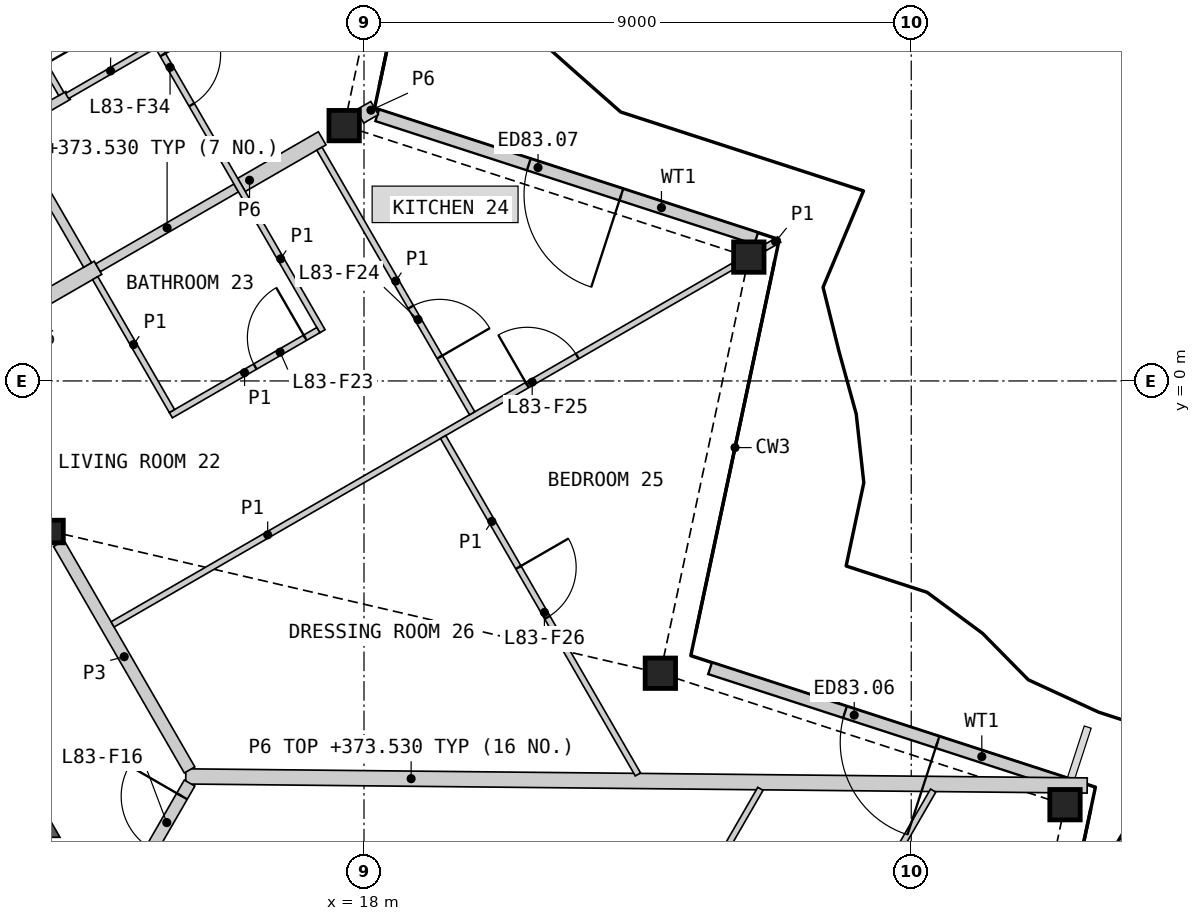
"""IFC4 building model, lengths in metres.
Left out: names, types, materials, properties, quantities, classifications, styles, units other than length and angle.
Written with IfcOpenShell. Run it as: python <this file> out.ifc"""

import sys

from ifc_helpers import new_model, si_unit, direction, frame, frame_2d, origin, origin_2d, place, context, subcontext, project, spatial, polyline, rectangle, hollow_rectangle, i_section, outline, extrude, element, fill, save


model = new_model("IFC4")
c1 = context("Model", 3, precision=1e-05, world=origin(), true_north=direction((0.0, 1.0)))
c2 = subcontext(c1, "Body", "Model", "MODEL_VIEW")
j1 = project(units=[si_unit("LENGTHUNIT", "METRE"), si_unit("PLANEANGLEUNIT", "RADIAN")], contexts=[c1])
p1 = place(None, origin())
s1 = spatial("IfcSite", under=j1, at=p1, CompositionType="ELEMENT")
p2 = place(p1, origin())
s2 = spatial("IfcBuilding", under=s1, at=p2, CompositionType="ELEMENT")
p3 = place(p2, frame((0.0, 0.0, 371.2)))
s3 = spatial("IfcBuildingStorey", under=s2, at=p3, CompositionType="ELEMENT", Elevation=371.2)
for number, where, z_axis, x_axis in (
    (1, (29.529, -6.969, 0.0), (0.0, 0.0, 1.0), (1.0, 0.0, 0.0)),
    (2, (22.874, -4.807, 0.0), (0.0, 0.0, 1.0), (1.0, 0.0, 0.0)),
    (3, (24.329, 2.037, 0.0), (0.0, 0.0, 1.0), (1.0, 0.0, 0.0)),
    (4, (17.674, 4.199, 0.0), (0.0, 0.0, 1.0), (1.0, 0.0, 0.0)),
):
    element("IfcColumn", number, at=place(p3, frame(where, z_axis=z_axis, x_axis=x_axis)), inside=s3, PredefinedType="COLUMN", context=c2, shape_type="SweptSolid", body=[
        extrude(hollow_rectangle(XDim=0.5, YDim=0.5, WallThickness=0.03, at=origin_2d()), origin(), (0.0, 0.0, 1.0), 3.4),
    ])
p4 = place(p3, frame((12.868, -2.476, 0.0), z_axis=(0.0, 0.0, 1.0), x_axis=(1.0, 0.0, 0.0)))
e5 = element("IfcColumn", 5, at=p4, inside=s3, PredefinedType="COLUMN", context=c2, shape_type="SweptSolid", body=[
    extrude(i_section(OverallWidth=0.374, OverallDepth=0.372, WebThickness=0.016, FlangeThickness=0.026, at=origin_2d()), origin(), (0.0, 0.0, 1.0), 3.4),
])
p5 = place(p3, frame((29.65, -6.663, 0.0), z_axis=(0.0, 0.0, 1.0), x_axis=(-0.951056402988, 0.3090173431, 0.0)))
e6 = element("IfcWall", 6, at=p5, inside=s3, PredefinedType="SOLIDWALL", context=c2, shape_type="SweptSolid", body=[
    extrude(rectangle(XDim=6.265, YDim=0.2, at=frame_2d((3.133, 0.0))), origin(), (0.0, 0.0, 1.0), 2.634),
])
p6 = place(p5, frame((2.333, 0.0, 0.0)))
e7 = element("IfcOpeningElement", 7, at=p6, cuts=e6, PredefinedType="OPENING", context=c2, shape_type="SweptSolid", body=[
    extrude(rectangle(XDim=1.6, YDim=2.25, at=frame_2d((0.8, 1.125))), frame((0.0, 0.11, 0.0), z_axis=(0.0, -1.0, 0.0), x_axis=(1.0, 0.0, 0.0)), (0.0, 0.0, 1.0), 0.22),
])
p7 = place(p3, frame((24.45, 2.344, 0.0), z_axis=(0.0, 0.0, 1.0), x_axis=(-0.951062538214, 0.308998460199, 0.0)))
e8 = element("IfcWall", 8, at=p7, inside=s3, PredefinedType="SOLIDWALL", context=c2, shape_type="SweptSolid", body=[
    extrude(rectangle(XDim=6.553, YDim=0.2, at=frame_2d((3.277, 0.0))), origin(), (0.0, 0.0, 1.0), 2.634),
])
p8 = place(p7, frame((2.333, 0.0, 0.0)))
e9 = element("IfcOpeningElement", 9, at=p8, cuts=e8, PredefinedType="OPENING", context=c2, shape_type="SweptSolid", body=[
    extrude(rectangle(XDim=1.6, YDim=2.25, at=frame_2d((0.8, 1.125))), frame((0.0, 0.11, 0.0), z_axis=(0.0, -1.0, 0.0), x_axis=(1.0, 0.0, 0.0)), (0.0, 0.0, 1.0), 0.22),
])
p9 = place(p3, origin())
e10 = element("IfcWall", 10, at=p9, inside=s3, PredefinedType="SHEAR", context=c2, shape_type="SweptSolid", body=[
    extrude(outline(polyline([(11.961, -7.506), (11.961, -6.906), (12.48, -6.606), (13.0, -7.506), (11.961, -7.506)])), origin(), (0.0, 0.0, 1.0), 3.1),
])
p10 = place(p3, frame((15.069, -6.504, 0.0), z_axis=(0.0, 0.0, 1.0), x_axis=(0.999949045807, -0.01009483976, 0.0)))
e11 = element("IfcWall", 11, at=p10, inside=s3, PredefinedType="PARTITIONING", context=c2, shape_type="SweptSolid", body=[
    extrude(rectangle(XDim=14.825, YDim=0.25, at=frame_2d((7.413, 0.0))), origin(), (0.0, 0.0, 1.0), 2.33),
])
p11 = place(p3, frame((12.981, -2.673, 0.0), z_axis=(0.0, 0.0, 1.0), x_axis=(0.499986217557, -0.866033360935, 0.0)))
e12 = element("IfcWall", 12, at=p11, inside=s3, PredefinedType="PARTITIONING", context=c2, shape_type="SweptSolid", body=[
    extrude(rectangle(XDim=4.3, YDim=0.2, at=frame_2d((2.15, 0.0))), origin(), (0.0, 0.0, 1.0), 3.1),
])
p12 = place(p3, frame((13.293, -9.797, 0.0), z_axis=(0.0, 0.0, 1.0), x_axis=(0.499967746641, 0.866044024469, 0.0)))
e13 = element("IfcWall", 13, at=p12, inside=s3, PredefinedType="PARTITIONING", context=c2, shape_type="SweptSolid", body=[
    extrude(rectangle(XDim=3.676, YDim=0.2, at=frame_2d((1.838, 0.0))), origin(), (0.0, 0.0, 1.0), 3.1),
])
p13 = place(p12, frame((2.426, 0.0, 0.0)))
e14 = element("IfcOpeningElement", 14, at=p13, cuts=e13, PredefinedType="OPENING", context=c2, shape_type="SweptSolid", body=[
    extrude(rectangle(XDim=1.0, YDim=2.1, at=frame_2d((0.5, 1.05))), frame((0.0, 0.11, 0.0), z_axis=(0.0, -1.0, 0.0), x_axis=(1.0, 0.0, 0.0)), (0.0, 0.0, 1.0), 0.22),
])
p14 = place(p3, frame((11.265, 0.5, 0.0), z_axis=(0.0, 0.0, 1.0), x_axis=(0.866051307416, 0.49995513091, 0.0)))
e15 = element("IfcWall", 15, at=p14, inside=s3, PredefinedType="PARTITIONING", context=c2, shape_type="SweptSolid", body=[
    extrude(rectangle(XDim=2.725, YDim=0.25, at=frame_2d((1.362, 0.0))), origin(), (0.0, 0.0, 1.0), 2.33),
])
p15 = place(p3, frame((15.985, 3.224, 0.0), z_axis=(0.0, 0.0, 1.0), x_axis=(0.865989259495, 0.50006259852, 0.0)))
e16 = element("IfcWall", 16, at=p15, inside=s3, PredefinedType="PARTITIONING", context=c2, shape_type="SweptSolid", body=[
    extrude(rectangle(XDim=1.532, YDim=0.25, at=frame_2d((0.766, 0.0))), origin(), (0.0, 0.0, 1.0), 2.33),
])
p16 = place(p3, frame((17.934, 4.35, 0.0), z_axis=(0.0, 0.0, 1.0), x_axis=(0.866288059981, 0.499544789918, 0.0)))
e17 = element("IfcWall", 17, at=p16, inside=s3, PredefinedType="PARTITIONING", context=c2, shape_type="SweptSolid", body=[
    extrude(rectangle(XDim=0.278, YDim=0.25, at=frame_2d((0.139, 0.0))), origin(), (0.0, 0.0, 1.0), 2.33),
])
p17 = place(p3, frame((13.625, 1.862, 0.0), z_axis=(0.0, 0.0, 1.0), x_axis=(0.866013657776, 0.500020344131, 0.0)))
e18 = element("IfcWall", 18, at=p17, inside=s3, PredefinedType="PLUMBINGWALL", context=c2, shape_type="SweptSolid", body=[
    extrude(rectangle(XDim=2.625, YDim=0.15, at=frame_2d((1.312, 0.0))), origin(), (0.0, 0.0, 1.0), 2.33),
])
p18 = place(p3, frame((12.129, 4.203, 0.0), z_axis=(0.0, 0.0, 1.0), x_axis=(0.499993606316, -0.866029095148, 0.0)))
e19 = element("IfcWall", 19, at=p18, inside=s3, PredefinedType="PLUMBINGWALL", context=c2, shape_type="SweptSolid", body=[
    extrude(rectangle(XDim=2.65, YDim=0.15, at=frame_2d((1.325, 0.0))), origin(), (0.0, 0.0, 1.0), 2.33),
])
p19 = place(p3, frame((12.232, 4.175, 0.0), z_axis=(0.0, 0.0, 1.0), x_axis=(0.866056787991, 0.499945637019, 0.0)))
e20 = element("IfcWall", 20, at=p19, inside=s3, PredefinedType="PLUMBINGWALL", context=c2, shape_type="SweptSolid", body=[
    extrude(rectangle(XDim=1.042, YDim=0.15, at=frame_2d((0.521, 0.0))), origin(), (0.0, 0.0, 1.0), 2.33),
])
p20 = place(p3, frame((13.865, -4.004, 0.0), z_axis=(0.0, 0.0, 1.0), x_axis=(0.866023404247, 0.500003463284, 0.0)))
e21 = element("IfcWall", 21, at=p20, inside=s3, PredefinedType="PARTITIONING", context=c2, shape_type="SweptSolid", body=[
    extrude(rectangle(XDim=11.782, YDim=0.1, at=frame_2d((5.891, 0.0))), origin(), (0.0, 0.0, 1.0), 2.33),
])
p21 = place(p20, frame((7.874, 0.0, 0.0)))
e22 = element("IfcOpeningElement", 22, at=p21, cuts=e21, PredefinedType="OPENING", context=c2, shape_type="SweptSolid", body=[
    extrude(rectangle(XDim=0.95, YDim=2.1, at=frame_2d((0.475, 1.05))), frame((0.0, 0.06, 0.0), z_axis=(0.0, -1.0, 0.0), x_axis=(1.0, 0.0, 0.0)), (0.0, 0.0, 1.0), 0.12),
])
p22 = place(p3, frame((8.775, 5.066, 0.0), z_axis=(0.0, 0.0, 1.0), x_axis=(0.866023724155, 0.500002909193, 0.0)))
e23 = element("IfcWall", 23, at=p22, inside=s3, PredefinedType="PARTITIONING", context=c2, shape_type="SweptSolid", body=[
    extrude(rectangle(XDim=11.655, YDim=0.1, at=frame_2d((5.827, 0.0))), origin(), (0.0, 0.0, 1.0), 2.33),
])
p23 = place(p22, frame((3.751, 0.0, 0.0)))
e24 = element("IfcOpeningElement", 24, at=p23, cuts=e23, PredefinedType="OPENING", context=c2, shape_type="SweptSolid", body=[
    extrude(rectangle(XDim=0.95, YDim=2.1, at=frame_2d((0.475, 1.05))), frame((0.0, 0.06, 0.0), z_axis=(0.0, -1.0, 0.0), x_axis=(1.0, 0.0, 0.0)), (0.0, 0.0, 1.0), 0.12),
])
p24 = place(p3, frame((23.463, -13.488, 0.0), z_axis=(0.0, 0.0, 1.0), x_axis=(0.500012519194, 0.866018175704, 0.0)))
e25 = element("IfcWall", 25, at=p24, inside=s3, PredefinedType="PARTITIONING", context=c2, shape_type="SweptSolid", body=[
    extrude(rectangle(XDim=7.796, YDim=0.1, at=frame_2d((3.898, 0.0))), origin(), (0.0, 0.0, 1.0), 2.33),
])
p25 = place(p24, frame((3.473, 0.0, 0.0)))
e26 = element("IfcOpeningElement", 26, at=p25, cuts=e25, PredefinedType="OPENING", context=c2, shape_type="SweptSolid", body=[
    extrude(rectangle(XDim=0.95, YDim=2.1, at=frame_2d((0.475, 1.05))), frame((0.0, 0.06, 0.0), z_axis=(0.0, -1.0, 0.0), x_axis=(1.0, 0.0, 0.0)), (0.0, 0.0, 1.0), 0.12),
])
p26 = place(p3, frame((19.302, -0.923, 0.0), z_axis=(0.0, 0.0, 1.0), x_axis=(0.499999516514, -0.866025682925, 0.0)))
e27 = element("IfcWall", 27, at=p26, inside=s3, PredefinedType="PARTITIONING", context=c2, shape_type="SweptSolid", body=[
    extrude(rectangle(XDim=6.407, YDim=0.1, at=frame_2d((3.204, 0.0))), origin(), (0.0, 0.0, 1.0), 2.33),
])
p27 = place(p26, frame((2.476, 0.0, 0.0)))
e28 = element("IfcOpeningElement", 28, at=p27, cuts=e27, PredefinedType="OPENING", context=c2, shape_type="SweptSolid", body=[
    extrude(rectangle(XDim=0.95, YDim=2.1, at=frame_2d((0.475, 1.05))), frame((0.0, 0.06, 0.0), z_axis=(0.0, -1.0, 0.0), x_axis=(1.0, 0.0, 0.0)), (0.0, 0.0, 1.0), 0.12),
])
p28 = place(p3, frame((21.319, -12.251, 0.0), z_axis=(0.0, 0.0, 1.0), x_axis=(0.499999833739, 0.866025499775, 0.0)))
e29 = element("IfcWall", 29, at=p28, inside=s3, PredefinedType="PARTITIONING", context=c2, shape_type="SweptSolid", body=[
    extrude(rectangle(XDim=6.4, YDim=0.1, at=frame_2d((3.2, 0.0))), origin(), (0.0, 0.0, 1.0), 2.33),
])
p29 = place(p28, frame((1.26, 0.0, 0.0)))
e30 = element("IfcOpeningElement", 30, at=p29, cuts=e29, PredefinedType="OPENING", context=c2, shape_type="SweptSolid", body=[
    extrude(rectangle(XDim=0.95, YDim=2.1, at=frame_2d((0.475, 1.05))), frame((0.0, 0.06, 0.0), z_axis=(0.0, -1.0, 0.0), x_axis=(1.0, 0.0, 0.0)), (0.0, 0.0, 1.0), 0.12),
])
p30 = place(p3, frame((14.567, 5.581, 0.0), z_axis=(0.0, 0.0, 1.0), x_axis=(0.499996545922, -0.866027397988, 0.0)))
e31 = element("IfcWall", 31, at=p30, inside=s3, PredefinedType="PARTITIONING", context=c2, shape_type="SweptSolid", body=[
    extrude(rectangle(XDim=5.5, YDim=0.1, at=frame_2d((2.75, 0.0))), origin(), (0.0, 0.0, 1.0), 2.33),
])
p31 = place(p30, frame((0.25, 0.0, 0.0)))
e32 = element("IfcOpeningElement", 32, at=p31, cuts=e31, PredefinedType="OPENING", context=c2, shape_type="SweptSolid", body=[
    extrude(rectangle(XDim=0.95, YDim=2.1, at=frame_2d((0.475, 1.05))), frame((0.0, 0.06, 0.0), z_axis=(0.0, -1.0, 0.0), x_axis=(1.0, 0.0, 0.0)), (0.0, 0.0, 1.0), 0.12),
])
p32 = place(p3, frame((17.266, 3.82, 0.0), z_axis=(0.0, 0.0, 1.0), x_axis=(0.499990214365, -0.86603105345, 0.0)))
e33 = element("IfcWall", 33, at=p32, inside=s3, PredefinedType="PARTITIONING", context=c2, shape_type="SweptSolid", body=[
    extrude(rectangle(XDim=5.025, YDim=0.1, at=frame_2d((2.512, 0.0))), origin(), (0.0, 0.0, 1.0), 2.33),
])
p33 = place(p32, frame((3.008, 0.0, 0.0)))
e34 = element("IfcOpeningElement", 34, at=p33, cuts=e33, PredefinedType="OPENING", context=c2, shape_type="SweptSolid", body=[
    extrude(rectangle(XDim=0.95, YDim=2.1, at=frame_2d((0.475, 1.05))), frame((0.0, 0.06, 0.0), z_axis=(0.0, -1.0, 0.0), x_axis=(1.0, 0.0, 0.0)), (0.0, 0.0, 1.0), 0.12),
])
p34 = place(p3, frame((14.823, -0.564, 0.0), z_axis=(0.0, 0.0, 1.0), x_axis=(0.866034573852, 0.49998411664, 0.0)))
e35 = element("IfcWall", 35, at=p34, inside=s3, PredefinedType="PARTITIONING", context=c2, shape_type="SweptSolid", body=[
    extrude(rectangle(XDim=2.8, YDim=0.1, at=frame_2d((1.4, 0.0))), origin(), (0.0, 0.0, 1.0), 2.33),
])
p35 = place(p34, frame((1.6, 0.0, 0.0)))
e36 = element("IfcOpeningElement", 36, at=p35, cuts=e35, PredefinedType="OPENING", context=c2, shape_type="SweptSolid", body=[
    extrude(rectangle(XDim=0.95, YDim=2.1, at=frame_2d((0.475, 1.05))), frame((0.0, 0.06, 0.0), z_axis=(0.0, -1.0, 0.0), x_axis=(1.0, 0.0, 0.0)), (0.0, 0.0, 1.0), 0.12),
])
p36 = place(p3, frame((13.579, 1.691, 0.0), z_axis=(0.0, 0.0, 1.0), x_axis=(0.500048846702, -0.865997200291, 0.0)))
e37 = element("IfcWall", 37, at=p36, inside=s3, PredefinedType="PARTITIONING", context=c2, shape_type="SweptSolid", body=[
    extrude(rectangle(XDim=2.525, YDim=0.1, at=frame_2d((1.263, 0.0))), origin(), (0.0, 0.0, 1.0), 2.33),
])
p37 = place(p3, frame((11.835, 6.775, 0.0), z_axis=(0.0, 0.0, 1.0), x_axis=(0.500030943131, -0.866007538022, 0.0)))
e38 = element("IfcWall", 38, at=p37, inside=s3, PredefinedType="PARTITIONING", context=c2, shape_type="SweptSolid", body=[
    extrude(rectangle(XDim=2.375, YDim=0.1, at=frame_2d((1.188, 0.0))), origin(), (0.0, 0.0, 1.0), 2.33),
])
p38 = place(p37, frame((0.867, 0.0, 0.0)))
e39 = element("IfcOpeningElement", 39, at=p38, cuts=e38, PredefinedType="OPENING", context=c2, shape_type="SweptSolid", body=[
    extrude(rectangle(XDim=0.95, YDim=2.1, at=frame_2d((0.475, 1.05))), frame((0.0, 0.06, 0.0), z_axis=(0.0, -1.0, 0.0), x_axis=(1.0, 0.0, 0.0)), (0.0, 0.0, 1.0), 0.12),
])
p39 = place(p3, frame((13.116, 4.686, 0.0), z_axis=(0.0, 0.0, 1.0), x_axis=(0.866072496716, 0.499918423778, 0.0)))
e40 = element("IfcWall", 40, at=p39, inside=s3, PredefinedType="PARTITIONING", context=c2, shape_type="SweptSolid", body=[
    extrude(rectangle(XDim=1.654, YDim=0.1, at=frame_2d((0.827, 0.0))), origin(), (0.0, 0.0, 1.0), 2.33),
])
p40 = place(p3, frame((24.589, 2.188, 0.0), z_axis=(0.0, 0.0, 1.0), x_axis=(0.866288059981, 0.499544789918, 0.0)))
e41 = element("IfcWall", 41, at=p40, inside=s3, PredefinedType="PARTITIONING", context=c2, shape_type="SweptSolid", body=[
    extrude(rectangle(XDim=0.278, YDim=0.1, at=frame_2d((0.139, 0.0))), origin(), (0.0, 0.0, 1.0), 2.33),
])
p41 = place(p6, origin())
e42 = element("IfcDoor", 42, at=p41, inside=s3, OperationType="DOUBLE_DOOR_SINGLE_SWING", PredefinedType="DOOR", context=c2, shape_type="SweptSolid", body=[
    extrude(rectangle(XDim=1.6, YDim=2.25, at=frame_2d((0.8, 1.125))), frame((0.0, 0.025, 0.0), z_axis=(0.0, -1.0, 0.0), x_axis=(1.0, 0.0, 0.0)), (0.0, 0.0, 1.0), 0.05),
])
fill(e7, e42)
p42 = place(p8, origin())
e43 = element("IfcDoor", 43, at=p42, inside=s3, OperationType="DOUBLE_DOOR_SINGLE_SWING", PredefinedType="DOOR", context=c2, shape_type="SweptSolid", body=[
    extrude(rectangle(XDim=1.6, YDim=2.25, at=frame_2d((0.8, 1.125))), frame((0.0, 0.025, 0.0), z_axis=(0.0, -1.0, 0.0), x_axis=(1.0, 0.0, 0.0)), (0.0, 0.0, 1.0), 0.05),
])
fill(e9, e43)
p43 = place(p13, origin())
e44 = element("IfcDoor", 44, at=p43, inside=s3, OperationType="SINGLE_SWING_RIGHT", PredefinedType="DOOR", context=c2, shape_type="SweptSolid", body=[
    extrude(rectangle(XDim=1.0, YDim=2.1, at=frame_2d((0.5, 1.05))), frame((0.0, 0.025, 0.0), z_axis=(0.0, -1.0, 0.0), x_axis=(1.0, 0.0, 0.0)), (0.0, 0.0, 1.0), 0.05),
])
fill(e14, e44)
p44 = place(p35, origin())
e45 = element("IfcDoor", 45, at=p44, inside=s3, OperationType="SINGLE_SWING_RIGHT", PredefinedType="DOOR", context=c2, shape_type="SweptSolid", body=[
    extrude(rectangle(XDim=0.95, YDim=2.1, at=frame_2d((0.475, 1.05))), frame((0.0, 0.025, 0.0), z_axis=(0.0, -1.0, 0.0), x_axis=(1.0, 0.0, 0.0)), (0.0, 0.0, 1.0), 0.05),
])
fill(e36, e45)
p45 = place(p33, origin())
e46 = element("IfcDoor", 46, at=p45, inside=s3, OperationType="SINGLE_SWING_RIGHT", PredefinedType="DOOR", context=c2, shape_type="SweptSolid", body=[
    extrude(rectangle(XDim=0.95, YDim=2.1, at=frame_2d((0.475, 1.05))), frame((0.0, 0.025, 0.0), z_axis=(0.0, -1.0, 0.0), x_axis=(1.0, 0.0, 0.0)), (0.0, 0.0, 1.0), 0.05),
])
fill(e34, e46)
p46 = place(p21, origin())
e47 = element("IfcDoor", 47, at=p46, inside=s3, OperationType="SINGLE_SWING_LEFT", PredefinedType="DOOR", context=c2, shape_type="SweptSolid", body=[
    extrude(rectangle(XDim=0.95, YDim=2.1, at=frame_2d((0.475, 1.05))), frame((0.0, 0.025, 0.0), z_axis=(0.0, -1.0, 0.0), x_axis=(1.0, 0.0, 0.0)), (0.0, 0.0, 1.0), 0.05),
])
fill(e22, e47)
p47 = place(p27, origin())
e48 = element("IfcDoor", 48, at=p47, inside=s3, OperationType="SINGLE_SWING_LEFT", PredefinedType="DOOR", context=c2, shape_type="SweptSolid", body=[
    extrude(rectangle(XDim=0.95, YDim=2.1, at=frame_2d((0.475, 1.05))), frame((0.0, 0.025, 0.0), z_axis=(0.0, -1.0, 0.0), x_axis=(1.0, 0.0, 0.0)), (0.0, 0.0, 1.0), 0.05),
])
fill(e28, e48)
p48 = place(p31, origin())
e49 = element("IfcDoor", 49, at=p48, inside=s3, OperationType="SINGLE_SWING_LEFT", PredefinedType="DOOR", context=c2, shape_type="SweptSolid", body=[
    extrude(rectangle(XDim=0.95, YDim=2.1, at=frame_2d((0.475, 1.05))), frame((0.0, 0.025, 0.0), z_axis=(0.0, -1.0, 0.0), x_axis=(1.0, 0.0, 0.0)), (0.0, 0.0, 1.0), 0.05),
])
fill(e32, e49)
save(model, sys.argv[1])
